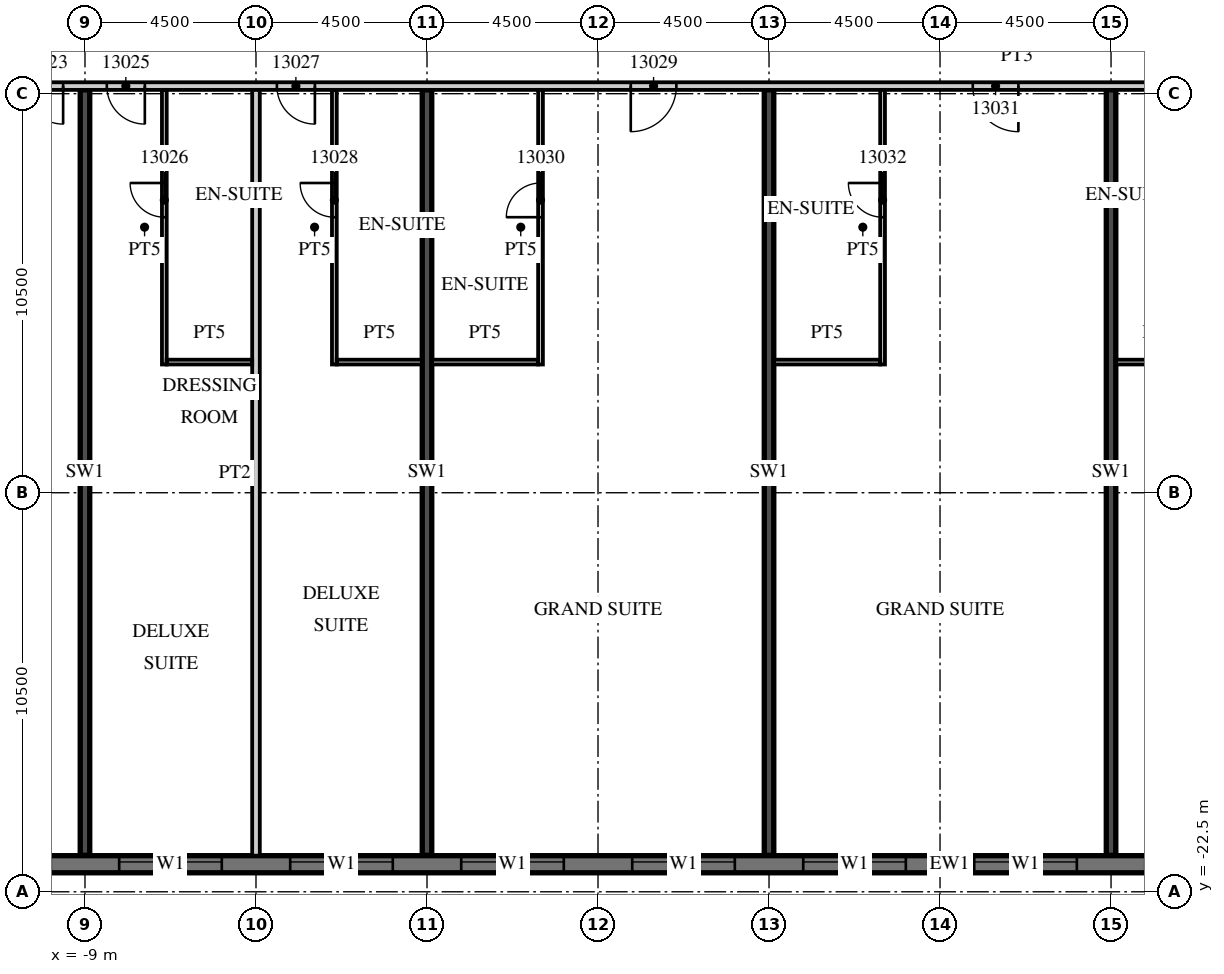
"""IFC4 building model, lengths in metres.
Left out: names, types, materials, properties, quantities, classifications, styles, units other than length and angle.
Written with IfcOpenShell. Run it as: python <this file> out.ifc"""

import sys

from ifc_helpers import new_model, si_unit, direction, frame, frame_2d, origin, place, context, subcontext, project, spatial, rectangle, extrude, element, fill, save


model = new_model("IFC4")
c1 = context("Model", 3, precision=1e-05, world=origin(), true_north=direction((0.0, 1.0)))
c2 = subcontext(c1, "Body", "Model", "MODEL_VIEW")
j1 = project(units=[si_unit("LENGTHUNIT", "METRE"), si_unit("PLANEANGLEUNIT", "RADIAN")], contexts=[c1])
p1 = place(None, origin())
s1 = spatial("IfcSite", under=j1, at=p1, CompositionType="ELEMENT")
p2 = place(p1, origin())
s2 = spatial("IfcBuilding", under=s1, at=p2, CompositionType="ELEMENT")
p3 = place(p2, frame((0.0, 0.0, 73.2)))
s3 = spatial("IfcBuildingStorey", under=s2, at=p3, CompositionType="ELEMENT", Elevation=73.2)
for number, where, z_axis, x_axis in (
    (1, (-9.0, -21.54, 0.0), (0.0, 0.0, 1.0), (0.0, 1.0, 0.0)),
    (2, (0.0, -21.54, 0.0), (0.0, 0.0, 1.0), (0.0, 1.0, 0.0)),
    (3, (9.0, -21.54, 0.0), (0.0, 0.0, 1.0), (0.0, 1.0, 0.0)),
    (4, (18.0, -21.54, 0.0), (0.0, 0.0, 1.0), (0.0, 1.0, 0.0)),
):
    element("IfcWall", number, at=place(p3, frame(where, z_axis=z_axis, x_axis=x_axis)), inside=s3, PredefinedType="SHEAR", context=c2, shape_type="SweptSolid", body=[
        extrude(rectangle(XDim=20.14, YDim=0.25, at=frame_2d((10.07, 0.0))), origin(), (0.0, 0.0, 1.0), 3.3),
    ])
p4 = place(p3, frame((-13.5, -21.775, 0.0), z_axis=(0.0, 0.0, 1.0), x_axis=(1.0, 0.0, 0.0)))
e5 = element("IfcWall", 5, at=p4, inside=s3, PredefinedType="SOLIDWALL", context=c2, shape_type="SweptSolid", body=[
    extrude(rectangle(XDim=54.5, YDim=0.45, at=frame_2d((27.25, 0.0))), origin(), (0.0, 0.0, 1.0), 3.02),
])
p5 = place(p4, frame((0.9, 0.0, 0.45)))
e6 = element("IfcOpeningElement", 6, at=p5, cuts=e5, PredefinedType="OPENING", context=c2, shape_type="SweptSolid", body=[
    extrude(rectangle(XDim=2.7, YDim=2.25, at=frame_2d((1.35, 1.125))), frame((0.0, 0.235, 0.0), z_axis=(0.0, -1.0, 0.0), x_axis=(1.0, 0.0, 0.0)), (0.0, 0.0, 1.0), 0.47),
])
p6 = place(p4, frame((5.4, 0.0, 0.45)))
e7 = element("IfcOpeningElement", 7, at=p6, cuts=e5, PredefinedType="OPENING", context=c2, shape_type="SweptSolid", body=[
    extrude(rectangle(XDim=2.7, YDim=2.25, at=frame_2d((1.35, 1.125))), frame((0.0, 0.235, 0.0), z_axis=(0.0, -1.0, 0.0), x_axis=(1.0, 0.0, 0.0)), (0.0, 0.0, 1.0), 0.47),
])
p7 = place(p4, frame((9.9, 0.0, 0.45)))
e8 = element("IfcOpeningElement", 8, at=p7, cuts=e5, PredefinedType="OPENING", context=c2, shape_type="SweptSolid", body=[
    extrude(rectangle(XDim=2.7, YDim=2.25, at=frame_2d((1.35, 1.125))), frame((0.0, 0.235, 0.0), z_axis=(0.0, -1.0, 0.0), x_axis=(1.0, 0.0, 0.0)), (0.0, 0.0, 1.0), 0.47),
])
p8 = place(p4, frame((14.4, 0.0, 0.45)))
e9 = element("IfcOpeningElement", 9, at=p8, cuts=e5, PredefinedType="OPENING", context=c2, shape_type="SweptSolid", body=[
    extrude(rectangle(XDim=2.7, YDim=2.25, at=frame_2d((1.35, 1.125))), frame((0.0, 0.235, 0.0), z_axis=(0.0, -1.0, 0.0), x_axis=(1.0, 0.0, 0.0)), (0.0, 0.0, 1.0), 0.47),
])
p9 = place(p4, frame((18.9, 0.0, 0.45)))
e10 = element("IfcOpeningElement", 10, at=p9, cuts=e5, PredefinedType="OPENING", context=c2, shape_type="SweptSolid", body=[
    extrude(rectangle(XDim=2.7, YDim=2.25, at=frame_2d((1.35, 1.125))), frame((0.0, 0.235, 0.0), z_axis=(0.0, -1.0, 0.0), x_axis=(1.0, 0.0, 0.0)), (0.0, 0.0, 1.0), 0.47),
])
p10 = place(p4, frame((23.4, 0.0, 0.45)))
e11 = element("IfcOpeningElement", 11, at=p10, cuts=e5, PredefinedType="OPENING", context=c2, shape_type="SweptSolid", body=[
    extrude(rectangle(XDim=2.7, YDim=2.25, at=frame_2d((1.35, 1.125))), frame((0.0, 0.235, 0.0), z_axis=(0.0, -1.0, 0.0), x_axis=(1.0, 0.0, 0.0)), (0.0, 0.0, 1.0), 0.47),
])
p11 = place(p4, frame((27.9, 0.0, 0.45)))
e12 = element("IfcOpeningElement", 12, at=p11, cuts=e5, PredefinedType="OPENING", context=c2, shape_type="SweptSolid", body=[
    extrude(rectangle(XDim=2.7, YDim=2.25, at=frame_2d((1.35, 1.125))), frame((0.0, 0.235, 0.0), z_axis=(0.0, -1.0, 0.0), x_axis=(1.0, 0.0, 0.0)), (0.0, 0.0, 1.0), 0.47),
])
p12 = place(p4, frame((32.4, 0.0, 0.45)))
e13 = element("IfcOpeningElement", 13, at=p12, cuts=e5, PredefinedType="OPENING", context=c2, shape_type="SweptSolid", body=[
    extrude(rectangle(XDim=2.7, YDim=2.25, at=frame_2d((1.35, 1.125))), frame((0.0, 0.235, 0.0), z_axis=(0.0, -1.0, 0.0), x_axis=(1.0, 0.0, 0.0)), (0.0, 0.0, 1.0), 0.47),
])
p13 = place(p4, frame((36.9, 0.0, 0.45)))
e14 = element("IfcOpeningElement", 14, at=p13, cuts=e5, PredefinedType="OPENING", context=c2, shape_type="SweptSolid", body=[
    extrude(rectangle(XDim=2.7, YDim=2.25, at=frame_2d((1.35, 1.125))), frame((0.0, 0.235, 0.0), z_axis=(0.0, -1.0, 0.0), x_axis=(1.0, 0.0, 0.0)), (0.0, 0.0, 1.0), 0.47),
])
p14 = place(p4, frame((41.4, 0.0, 0.45)))
e15 = element("IfcOpeningElement", 15, at=p14, cuts=e5, PredefinedType="OPENING", context=c2, shape_type="SweptSolid", body=[
    extrude(rectangle(XDim=2.7, YDim=2.25, at=frame_2d((1.35, 1.125))), frame((0.0, 0.235, 0.0), z_axis=(0.0, -1.0, 0.0), x_axis=(1.0, 0.0, 0.0)), (0.0, 0.0, 1.0), 0.47),
])
p15 = place(p4, frame((45.9, 0.0, 0.45)))
e16 = element("IfcOpeningElement", 16, at=p15, cuts=e5, PredefinedType="OPENING", context=c2, shape_type="SweptSolid", body=[
    extrude(rectangle(XDim=2.7, YDim=2.25, at=frame_2d((1.35, 1.125))), frame((0.0, 0.235, 0.0), z_axis=(0.0, -1.0, 0.0), x_axis=(1.0, 0.0, 0.0)), (0.0, 0.0, 1.0), 0.47),
])
p16 = place(p4, frame((50.4, 0.0, 0.45)))
e17 = element("IfcOpeningElement", 17, at=p16, cuts=e5, PredefinedType="OPENING", context=c2, shape_type="SweptSolid", body=[
    extrude(rectangle(XDim=2.7, YDim=2.25, at=frame_2d((1.35, 1.125))), frame((0.0, 0.235, 0.0), z_axis=(0.0, -1.0, 0.0), x_axis=(1.0, 0.0, 0.0)), (0.0, 0.0, 1.0), 0.47),
])
p17 = place(p3, frame((-13.5, -1.3, 0.0), z_axis=(0.0, 0.0, 1.0), x_axis=(1.0, 0.0, 0.0)))
e18 = element("IfcWall", 18, at=p17, inside=s3, PredefinedType="PARTITIONING", context=c2, shape_type="SweptSolid", body=[
    extrude(rectangle(XDim=58.05, YDim=0.2, at=frame_2d((29.025, 0.0))), origin(), (0.0, 0.0, 1.0), 3.02),
])
p18 = place(p17, frame((2.925, 0.0, 0.0)))
e19 = element("IfcOpeningElement", 19, at=p18, cuts=e18, PredefinedType="OPENING", context=c2, shape_type="SweptSolid", body=[
    extrude(rectangle(XDim=1.0, YDim=2.1, at=frame_2d((0.5, 1.05))), frame((0.0, 0.11, 0.0), z_axis=(0.0, -1.0, 0.0), x_axis=(1.0, 0.0, 0.0)), (0.0, 0.0, 1.0), 0.22),
])
p19 = place(p17, frame((5.075, 0.0, 0.0)))
e20 = element("IfcOpeningElement", 20, at=p19, cuts=e18, PredefinedType="OPENING", context=c2, shape_type="SweptSolid", body=[
    extrude(rectangle(XDim=1.0, YDim=2.1, at=frame_2d((0.5, 1.05))), frame((0.0, 0.11, 0.0), z_axis=(0.0, -1.0, 0.0), x_axis=(1.0, 0.0, 0.0)), (0.0, 0.0, 1.0), 0.22),
])
p20 = place(p17, frame((9.55, 0.0, 0.0)))
e21 = element("IfcOpeningElement", 21, at=p20, cuts=e18, PredefinedType="OPENING", context=c2, shape_type="SweptSolid", body=[
    extrude(rectangle(XDim=1.0, YDim=2.1, at=frame_2d((0.5, 1.05))), frame((0.0, 0.11, 0.0), z_axis=(0.0, -1.0, 0.0), x_axis=(1.0, 0.0, 0.0)), (0.0, 0.0, 1.0), 0.22),
])
p21 = place(p17, frame((18.862, 0.0, 0.0)))
e22 = element("IfcOpeningElement", 22, at=p21, cuts=e18, PredefinedType="OPENING", context=c2, shape_type="SweptSolid", body=[
    extrude(rectangle(XDim=1.2, YDim=2.1, at=frame_2d((0.6, 1.05))), frame((0.0, 0.11, 0.0), z_axis=(0.0, -1.0, 0.0), x_axis=(1.0, 0.0, 0.0)), (0.0, 0.0, 1.0), 0.22),
])
p22 = place(p17, frame((27.862, 0.0, 0.0)))
e23 = element("IfcOpeningElement", 23, at=p22, cuts=e18, PredefinedType="OPENING", context=c2, shape_type="SweptSolid", body=[
    extrude(rectangle(XDim=1.2, YDim=2.1, at=frame_2d((0.6, 1.05))), frame((0.0, 0.11, 0.0), z_axis=(0.0, -1.0, 0.0), x_axis=(1.0, 0.0, 0.0)), (0.0, 0.0, 1.0), 0.22),
])
p23 = place(p17, frame((34.45, 0.0, 0.0)))
e24 = element("IfcOpeningElement", 24, at=p23, cuts=e18, PredefinedType="OPENING", context=c2, shape_type="SweptSolid", body=[
    extrude(rectangle(XDim=1.0, YDim=2.1, at=frame_2d((0.5, 1.05))), frame((0.0, 0.11, 0.0), z_axis=(0.0, -1.0, 0.0), x_axis=(1.0, 0.0, 0.0)), (0.0, 0.0, 1.0), 0.22),
])
p24 = place(p17, frame((38.925, 0.0, 0.0)))
e25 = element("IfcOpeningElement", 25, at=p24, cuts=e18, PredefinedType="OPENING", context=c2, shape_type="SweptSolid", body=[
    extrude(rectangle(XDim=1.0, YDim=2.1, at=frame_2d((0.5, 1.05))), frame((0.0, 0.11, 0.0), z_axis=(0.0, -1.0, 0.0), x_axis=(1.0, 0.0, 0.0)), (0.0, 0.0, 1.0), 0.22),
])
p25 = place(p17, frame((45.862, 0.0, 0.0)))
e26 = element("IfcOpeningElement", 26, at=p25, cuts=e18, PredefinedType="OPENING", context=c2, shape_type="SweptSolid", body=[
    extrude(rectangle(XDim=1.2, YDim=2.1, at=frame_2d((0.6, 1.05))), frame((0.0, 0.11, 0.0), z_axis=(0.0, -1.0, 0.0), x_axis=(1.0, 0.0, 0.0)), (0.0, 0.0, 1.0), 0.22),
])
p26 = place(p17, frame((50.075, 0.0, 0.0)))
e27 = element("IfcOpeningElement", 27, at=p26, cuts=e18, PredefinedType="OPENING", context=c2, shape_type="SweptSolid", body=[
    extrude(rectangle(XDim=1.0, YDim=2.1, at=frame_2d((0.5, 1.05))), frame((0.0, 0.11, 0.0), z_axis=(0.0, -1.0, 0.0), x_axis=(1.0, 0.0, 0.0)), (0.0, 0.0, 1.0), 0.22),
])
p27 = place(p17, frame((56.525, 0.0, 0.0)))
e28 = element("IfcOpeningElement", 28, at=p27, cuts=e18, PredefinedType="OPENING", context=c2, shape_type="SweptSolid", body=[
    extrude(rectangle(XDim=1.0, YDim=2.1, at=frame_2d((0.5, 1.05))), frame((0.0, 0.11, 0.0), z_axis=(0.0, -1.0, 0.0), x_axis=(1.0, 0.0, 0.0)), (0.0, 0.0, 1.0), 0.22),
])
p28 = place(p3, frame((-4.5, -21.55, 0.0), z_axis=(0.0, 0.0, 1.0), x_axis=(0.0, 1.0, 0.0)))
e29 = element("IfcWall", 29, at=p28, inside=s3, PredefinedType="PARTITIONING", context=c2, shape_type="SweptSolid", body=[
    extrude(rectangle(XDim=20.15, YDim=0.2, at=frame_2d((10.075, 0.0))), origin(), (0.0, 0.0, 1.0), 3.02),
])
p29 = place(p3, frame((-6.912, -8.625, 0.0), z_axis=(0.0, 0.0, 1.0), x_axis=(0.0, 1.0, 0.0)))
e30 = element("IfcWall", 30, at=p29, inside=s3, PredefinedType="PARTITIONING", context=c2, shape_type="SweptSolid", body=[
    extrude(rectangle(XDim=7.225, YDim=0.125, at=frame_2d((3.613, 0.0))), origin(), (0.0, 0.0, 1.0), 3.02),
])
p30 = place(p29, frame((3.875, 0.0, 0.0)))
e31 = element("IfcOpeningElement", 31, at=p30, cuts=e30, PredefinedType="OPENING", context=c2, shape_type="SweptSolid", body=[
    extrude(rectangle(XDim=0.9, YDim=2.1, at=frame_2d((0.45, 1.05))), frame((0.0, 0.073, 0.0), z_axis=(0.0, -1.0, 0.0), x_axis=(1.0, 0.0, 0.0)), (0.0, 0.0, 1.0), 0.145),
])
p31 = place(p3, frame((-6.85, -8.562, 0.0), z_axis=(0.0, 0.0, 1.0), x_axis=(1.0, 0.0, 0.0)))
e32 = element("IfcWall", 32, at=p31, inside=s3, PredefinedType="PARTITIONING", context=c2, shape_type="SweptSolid", body=[
    extrude(rectangle(XDim=2.25, YDim=0.125, at=frame_2d((1.125, 0.0))), origin(), (0.0, 0.0, 1.0), 3.02),
])
p32 = place(p3, frame((-2.438, -8.625, 0.0), z_axis=(0.0, 0.0, 1.0), x_axis=(0.0, 1.0, 0.0)))
e33 = element("IfcWall", 33, at=p32, inside=s3, PredefinedType="PARTITIONING", context=c2, shape_type="SweptSolid", body=[
    extrude(rectangle(XDim=7.225, YDim=0.125, at=frame_2d((3.613, 0.0))), origin(), (0.0, 0.0, 1.0), 3.02),
])
p33 = place(p32, frame((3.875, 0.0, 0.0)))
e34 = element("IfcOpeningElement", 34, at=p33, cuts=e33, PredefinedType="OPENING", context=c2, shape_type="SweptSolid", body=[
    extrude(rectangle(XDim=0.9, YDim=2.1, at=frame_2d((0.45, 1.05))), frame((0.0, 0.073, 0.0), z_axis=(0.0, -1.0, 0.0), x_axis=(1.0, 0.0, 0.0)), (0.0, 0.0, 1.0), 0.145),
])
p34 = place(p3, frame((-2.375, -8.562, 0.0), z_axis=(0.0, 0.0, 1.0), x_axis=(1.0, 0.0, 0.0)))
e35 = element("IfcWall", 35, at=p34, inside=s3, PredefinedType="PARTITIONING", context=c2, shape_type="SweptSolid", body=[
    extrude(rectangle(XDim=2.25, YDim=0.125, at=frame_2d((1.125, 0.0))), origin(), (0.0, 0.0, 1.0), 3.02),
])
p35 = place(p3, frame((2.987, -8.625, 0.0), z_axis=(0.0, 0.0, 1.0), x_axis=(0.0, 1.0, 0.0)))
e36 = element("IfcWall", 36, at=p35, inside=s3, PredefinedType="PARTITIONING", context=c2, shape_type="SweptSolid", body=[
    extrude(rectangle(XDim=7.225, YDim=0.125, at=frame_2d((3.613, 0.0))), origin(), (0.0, 0.0, 1.0), 3.02),
])
p36 = place(p35, frame((3.875, 0.0, 0.0)))
e37 = element("IfcOpeningElement", 37, at=p36, cuts=e36, PredefinedType="OPENING", context=c2, shape_type="SweptSolid", body=[
    extrude(rectangle(XDim=0.9, YDim=2.1, at=frame_2d((0.45, 1.05))), frame((0.0, 0.073, 0.0), z_axis=(0.0, -1.0, 0.0), x_axis=(1.0, 0.0, 0.0)), (0.0, 0.0, 1.0), 0.145),
])
p37 = place(p3, frame((0.125, -8.562, 0.0), z_axis=(0.0, 0.0, 1.0), x_axis=(1.0, 0.0, 0.0)))
e38 = element("IfcWall", 38, at=p37, inside=s3, PredefinedType="PARTITIONING", context=c2, shape_type="SweptSolid", body=[
    extrude(rectangle(XDim=2.8, YDim=0.125, at=frame_2d((1.4, 0.0))), origin(), (0.0, 0.0, 1.0), 3.02),
])
p38 = place(p3, frame((11.988, -8.625, 0.0), z_axis=(0.0, 0.0, 1.0), x_axis=(0.0, 1.0, 0.0)))
e39 = element("IfcWall", 39, at=p38, inside=s3, PredefinedType="PARTITIONING", context=c2, shape_type="SweptSolid", body=[
    extrude(rectangle(XDim=7.225, YDim=0.125, at=frame_2d((3.613, 0.0))), origin(), (0.0, 0.0, 1.0), 3.02),
])
p39 = place(p38, frame((3.875, 0.0, 0.0)))
e40 = element("IfcOpeningElement", 40, at=p39, cuts=e39, PredefinedType="OPENING", context=c2, shape_type="SweptSolid", body=[
    extrude(rectangle(XDim=0.9, YDim=2.1, at=frame_2d((0.45, 1.05))), frame((0.0, 0.073, 0.0), z_axis=(0.0, -1.0, 0.0), x_axis=(1.0, 0.0, 0.0)), (0.0, 0.0, 1.0), 0.145),
])
p40 = place(p3, frame((9.125, -8.562, 0.0), z_axis=(0.0, 0.0, 1.0), x_axis=(1.0, 0.0, 0.0)))
e41 = element("IfcWall", 41, at=p40, inside=s3, PredefinedType="PARTITIONING", context=c2, shape_type="SweptSolid", body=[
    extrude(rectangle(XDim=2.8, YDim=0.125, at=frame_2d((1.4, 0.0))), origin(), (0.0, 0.0, 1.0), 3.02),
])
p41 = place(p3, frame((18.125, -8.562, 0.0), z_axis=(0.0, 0.0, 1.0), x_axis=(1.0, 0.0, 0.0)))
e42 = element("IfcWall", 42, at=p41, inside=s3, PredefinedType="PARTITIONING", context=c2, shape_type="SweptSolid", body=[
    extrude(rectangle(XDim=2.25, YDim=0.125, at=frame_2d((1.125, 0.0))), origin(), (0.0, 0.0, 1.0), 3.02),
])
p42 = place(p6, origin())
e43 = element("IfcWindow", 43, at=p42, inside=s3, PartitioningType="SINGLE_PANEL", PredefinedType="WINDOW", context=c2, shape_type="SweptSolid", body=[
    extrude(rectangle(XDim=2.7, YDim=2.25, at=frame_2d((1.35, 1.125))), frame((0.0, 0.09, 0.0), z_axis=(0.0, -1.0, 0.0), x_axis=(1.0, 0.0, 0.0)), (0.0, 0.0, 1.0), 0.06),
])
fill(e7, e43)
p43 = place(p7, origin())
e44 = element("IfcWindow", 44, at=p43, inside=s3, PartitioningType="SINGLE_PANEL", PredefinedType="WINDOW", context=c2, shape_type="SweptSolid", body=[
    extrude(rectangle(XDim=2.7, YDim=2.25, at=frame_2d((1.35, 1.125))), frame((0.0, 0.09, 0.0), z_axis=(0.0, -1.0, 0.0), x_axis=(1.0, 0.0, 0.0)), (0.0, 0.0, 1.0), 0.06),
])
fill(e8, e44)
p44 = place(p8, origin())
e45 = element("IfcWindow", 45, at=p44, inside=s3, PartitioningType="SINGLE_PANEL", PredefinedType="WINDOW", context=c2, shape_type="SweptSolid", body=[
    extrude(rectangle(XDim=2.7, YDim=2.25, at=frame_2d((1.35, 1.125))), frame((0.0, 0.09, 0.0), z_axis=(0.0, -1.0, 0.0), x_axis=(1.0, 0.0, 0.0)), (0.0, 0.0, 1.0), 0.06),
])
fill(e9, e45)
p45 = place(p9, origin())
e46 = element("IfcWindow", 46, at=p45, inside=s3, PartitioningType="SINGLE_PANEL", PredefinedType="WINDOW", context=c2, shape_type="SweptSolid", body=[
    extrude(rectangle(XDim=2.7, YDim=2.25, at=frame_2d((1.35, 1.125))), frame((0.0, 0.09, 0.0), z_axis=(0.0, -1.0, 0.0), x_axis=(1.0, 0.0, 0.0)), (0.0, 0.0, 1.0), 0.06),
])
fill(e10, e46)
p46 = place(p10, origin())
e47 = element("IfcWindow", 47, at=p46, inside=s3, PartitioningType="SINGLE_PANEL", PredefinedType="WINDOW", context=c2, shape_type="SweptSolid", body=[
    extrude(rectangle(XDim=2.7, YDim=2.25, at=frame_2d((1.35, 1.125))), frame((0.0, 0.09, 0.0), z_axis=(0.0, -1.0, 0.0), x_axis=(1.0, 0.0, 0.0)), (0.0, 0.0, 1.0), 0.06),
])
fill(e11, e47)
p47 = place(p11, origin())
e48 = element("IfcWindow", 48, at=p47, inside=s3, PartitioningType="SINGLE_PANEL", PredefinedType="WINDOW", context=c2, shape_type="SweptSolid", body=[
    extrude(rectangle(XDim=2.7, YDim=2.25, at=frame_2d((1.35, 1.125))), frame((0.0, 0.09, 0.0), z_axis=(0.0, -1.0, 0.0), x_axis=(1.0, 0.0, 0.0)), (0.0, 0.0, 1.0), 0.06),
])
fill(e12, e48)
p48 = place(p18, origin())
e49 = element("IfcDoor", 49, at=p48, inside=s3, OperationType="SINGLE_SWING_RIGHT", PredefinedType="DOOR", context=c2, shape_type="SweptSolid", body=[
    extrude(rectangle(XDim=1.0, YDim=2.1, at=frame_2d((0.5, 1.05))), frame((0.0, 0.025, 0.0), z_axis=(0.0, -1.0, 0.0), x_axis=(1.0, 0.0, 0.0)), (0.0, 0.0, 1.0), 0.05),
])
fill(e19, e49)
p49 = place(p19, origin())
e50 = element("IfcDoor", 50, at=p49, inside=s3, OperationType="SINGLE_SWING_RIGHT", PredefinedType="DOOR", context=c2, shape_type="SweptSolid", body=[
    extrude(rectangle(XDim=1.0, YDim=2.1, at=frame_2d((0.5, 1.05))), frame((0.0, 0.025, 0.0), z_axis=(0.0, -1.0, 0.0), x_axis=(1.0, 0.0, 0.0)), (0.0, 0.0, 1.0), 0.05),
])
fill(e20, e50)
p50 = place(p30, origin())
e51 = element("IfcDoor", 51, at=p50, inside=s3, OperationType="SINGLE_SWING_RIGHT", PredefinedType="DOOR", context=c2, shape_type="SweptSolid", body=[
    extrude(rectangle(XDim=0.9, YDim=2.1, at=frame_2d((0.45, 1.05))), frame((0.0, 0.025, 0.0), z_axis=(0.0, -1.0, 0.0), x_axis=(1.0, 0.0, 0.0)), (0.0, 0.0, 1.0), 0.05),
])
fill(e31, e51)
p51 = place(p20, origin())
e52 = element("IfcDoor", 52, at=p51, inside=s3, OperationType="SINGLE_SWING_RIGHT", PredefinedType="DOOR", context=c2, shape_type="SweptSolid", body=[
    extrude(rectangle(XDim=1.0, YDim=2.1, at=frame_2d((0.5, 1.05))), frame((0.0, 0.025, 0.0), z_axis=(0.0, -1.0, 0.0), x_axis=(1.0, 0.0, 0.0)), (0.0, 0.0, 1.0), 0.05),
])
fill(e21, e52)
p52 = place(p33, origin())
e53 = element("IfcDoor", 53, at=p52, inside=s3, OperationType="SINGLE_SWING_RIGHT", PredefinedType="DOOR", context=c2, shape_type="SweptSolid", body=[
    extrude(rectangle(XDim=0.9, YDim=2.1, at=frame_2d((0.45, 1.05))), frame((0.0, 0.025, 0.0), z_axis=(0.0, -1.0, 0.0), x_axis=(1.0, 0.0, 0.0)), (0.0, 0.0, 1.0), 0.05),
])
fill(e34, e53)
p53 = place(p21, origin())
e54 = element("IfcDoor", 54, at=p53, inside=s3, OperationType="SINGLE_SWING_LEFT", PredefinedType="DOOR", context=c2, shape_type="SweptSolid", body=[
    extrude(rectangle(XDim=1.2, YDim=2.1, at=frame_2d((0.6, 1.05))), frame((0.0, 0.025, 0.0), z_axis=(0.0, -1.0, 0.0), x_axis=(1.0, 0.0, 0.0)), (0.0, 0.0, 1.0), 0.05),
])
fill(e22, e54)
p54 = place(p36, origin())
e55 = element("IfcDoor", 55, at=p54, inside=s3, OperationType="SINGLE_SWING_LEFT", PredefinedType="DOOR", context=c2, shape_type="SweptSolid", body=[
    extrude(rectangle(XDim=0.9, YDim=2.1, at=frame_2d((0.45, 1.05))), frame((0.0, 0.025, 0.0), z_axis=(0.0, -1.0, 0.0), x_axis=(1.0, 0.0, 0.0)), (0.0, 0.0, 1.0), 0.05),
])
fill(e37, e55)
p55 = place(p22, origin())
e56 = element("IfcDoor", 56, at=p55, inside=s3, OperationType="SINGLE_SWING_RIGHT", PredefinedType="DOOR", context=c2, shape_type="SweptSolid", body=[
    extrude(rectangle(XDim=1.2, YDim=2.1, at=frame_2d((0.6, 1.05))), frame((0.0, 0.025, 0.0), z_axis=(0.0, -1.0, 0.0), x_axis=(1.0, 0.0, 0.0)), (0.0, 0.0, 1.0), 0.05),
])
fill(e23, e56)
p56 = place(p39, origin())
e57 = element("IfcDoor", 57, at=p56, inside=s3, OperationType="SINGLE_SWING_RIGHT", PredefinedType="DOOR", context=c2, shape_type="SweptSolid", body=[
    extrude(rectangle(XDim=0.9, YDim=2.1, at=frame_2d((0.45, 1.05))), frame((0.0, 0.025, 0.0), z_axis=(0.0, -1.0, 0.0), x_axis=(1.0, 0.0, 0.0)), (0.0, 0.0, 1.0), 0.05),
])
fill(e40, e57)
save(model, sys.argv[1])
